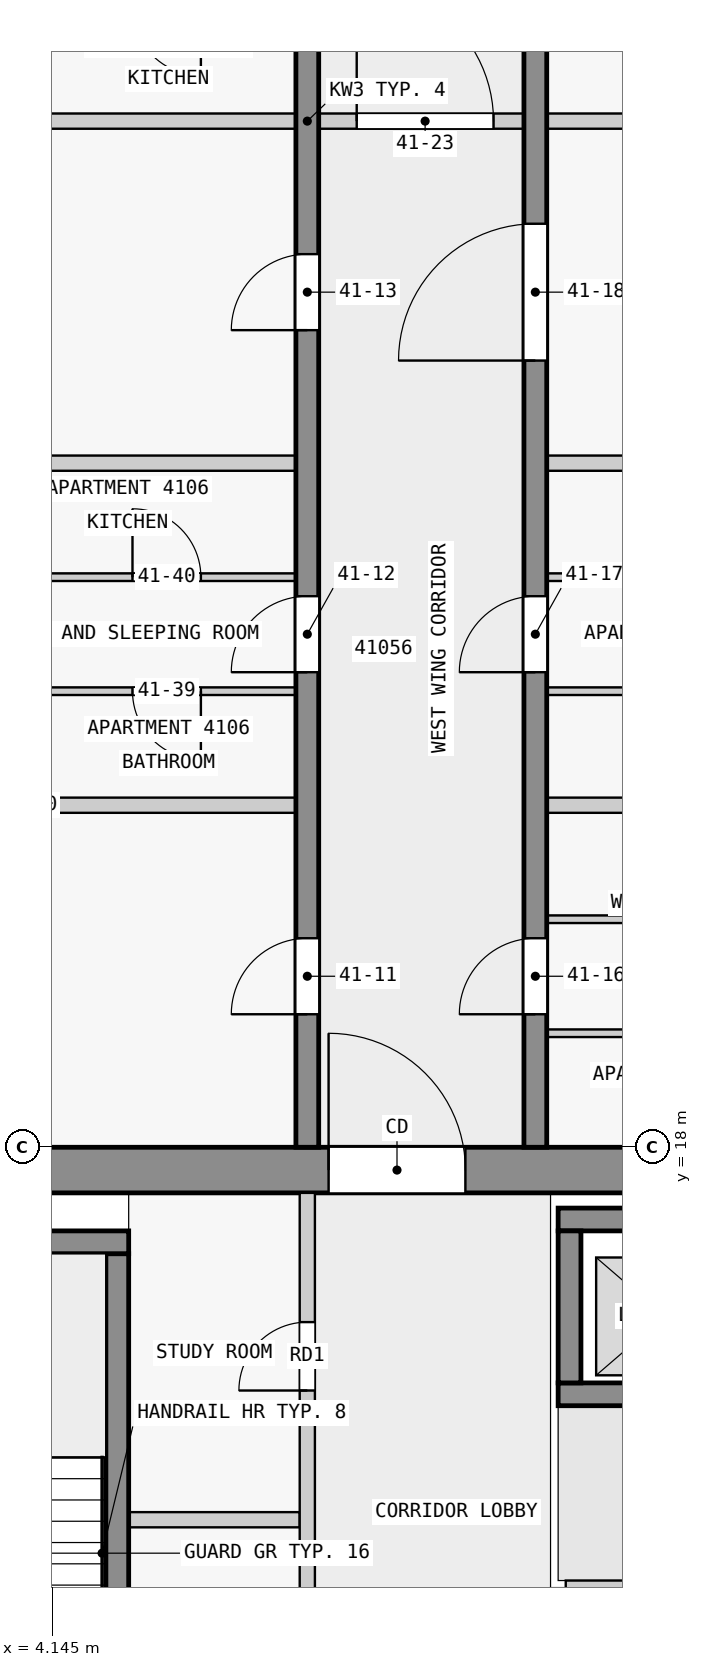
"""IFC4 building model, lengths in metres.
Left out: names, types, materials, properties, quantities, classifications, styles, units other than length and angle.
Written with IfcOpenShell. Run it as: python <this file> out.ifc"""

import sys

from ifc_helpers import new_model, si_unit, direction, frame, frame_2d, origin, place, context, subcontext, project, spatial, rectangle, extrude, element, fill, save


model = new_model("IFC4")
c1 = context("Model", 3, precision=1e-05, world=origin(), true_north=direction((0.0, 1.0)))
c2 = subcontext(c1, "Body", "Model", "MODEL_VIEW")
j1 = project(units=[si_unit("LENGTHUNIT", "METRE"), si_unit("PLANEANGLEUNIT", "RADIAN")], contexts=[c1])
p1 = place(None, origin())
s1 = spatial("IfcSite", under=j1, at=p1, CompositionType="ELEMENT")
p2 = place(p1, origin())
s2 = spatial("IfcBuilding", under=s1, at=p2, CompositionType="ELEMENT")
p3 = place(p2, frame((0.0, 0.0, 160.4)))
s3 = spatial("IfcBuildingStorey", under=s2, at=p3, CompositionType="ELEMENT", Elevation=160.4)
p4 = place(p3, frame((1.38, 17.7, 0.0), z_axis=(0.0, 0.0, 1.0), x_axis=(1.0, 0.0, 0.0)))
e1 = element("IfcWall", 1, at=p4, inside=s3, PredefinedType="SHEAR", context=c2, shape_type="SweptSolid", body=[
    extrude(rectangle(XDim=21.12, YDim=0.6, at=frame_2d((10.56, 0.0))), origin(), (0.0, 0.0, 1.0), 3.25),
])
p5 = place(p4, frame((6.4, 0.0, 0.0)))
e2 = element("IfcOpeningElement", 2, at=p5, cuts=e1, PredefinedType="OPENING", context=c2, shape_type="SweptSolid", body=[
    extrude(rectangle(XDim=1.8, YDim=2.1, at=frame_2d((0.9, 1.05))), frame((0.0, 0.31, 0.0), z_axis=(0.0, -1.0, 0.0), x_axis=(1.0, 0.0, 0.0)), (0.0, 0.0, 1.0), 0.62),
])
p6 = place(p3, frame((5.0, 10.2, 0.0), z_axis=(0.0, 0.0, 1.0), x_axis=(0.0, 1.0, 0.0)))
e3 = element("IfcWall", 3, at=p6, inside=s3, PredefinedType="SHEAR", context=c2, shape_type="SweptSolid", body=[
    extrude(rectangle(XDim=6.4, YDim=0.3, at=frame_2d((3.2, 0.0))), origin(), (0.0, 0.0, 1.0), 3.25),
])
p7 = place(p3, frame((2.3, 16.75, 0.0), z_axis=(0.0, 0.0, 1.0), x_axis=(1.0, 0.0, 0.0)))
e4 = element("IfcWall", 4, at=p7, inside=s3, PredefinedType="SHEAR", context=c2, shape_type="SweptSolid", body=[
    extrude(rectangle(XDim=2.85, YDim=0.3, at=frame_2d((1.425, 0.0))), origin(), (0.0, 0.0, 1.0), 3.25),
])
p8 = place(p3, frame((10.8, 17.05, 0.0), z_axis=(0.0, 0.0, 1.0), x_axis=(1.0, 0.0, 0.0)))
e5 = element("IfcWall", 5, at=p8, inside=s3, PredefinedType="SHEAR", context=c2, shape_type="SweptSolid", body=[
    extrude(rectangle(XDim=7.8, YDim=0.3, at=frame_2d((3.9, 0.0))), origin(), (0.0, 0.0, 1.0), 3.25),
])
p9 = place(p3, frame((10.8, 14.75, 0.0), z_axis=(0.0, 0.0, 1.0), x_axis=(1.0, 0.0, 0.0)))
e6 = element("IfcWall", 6, at=p9, inside=s3, PredefinedType="SHEAR", context=c2, shape_type="SweptSolid", body=[
    extrude(rectangle(XDim=7.8, YDim=0.3, at=frame_2d((3.9, 0.0))), origin(), (0.0, 0.0, 1.0), 3.25),
])
p10 = place(p9, frame((0.85, 0.0, 0.0)))
e7 = element("IfcOpeningElement", 7, at=p10, cuts=e6, PredefinedType="OPENING", context=c2, shape_type="SweptSolid", body=[
    extrude(rectangle(XDim=1.1, YDim=2.1, at=frame_2d((0.55, 1.05))), frame((0.0, 0.16, 0.0), z_axis=(0.0, -1.0, 0.0), x_axis=(1.0, 0.0, 0.0)), (0.0, 0.0, 1.0), 0.32),
])
p11 = place(p9, frame((3.35, 0.0, 0.0)))
e8 = element("IfcOpeningElement", 8, at=p11, cuts=e6, PredefinedType="OPENING", context=c2, shape_type="SweptSolid", body=[
    extrude(rectangle(XDim=1.1, YDim=2.1, at=frame_2d((0.55, 1.05))), frame((0.0, 0.16, 0.0), z_axis=(0.0, -1.0, 0.0), x_axis=(1.0, 0.0, 0.0)), (0.0, 0.0, 1.0), 0.32),
])
p12 = place(p9, frame((5.85, 0.0, 0.0)))
e9 = element("IfcOpeningElement", 9, at=p12, cuts=e6, PredefinedType="OPENING", context=c2, shape_type="SweptSolid", body=[
    extrude(rectangle(XDim=1.1, YDim=2.1, at=frame_2d((0.55, 1.05))), frame((0.0, 0.16, 0.0), z_axis=(0.0, -1.0, 0.0), x_axis=(1.0, 0.0, 0.0)), (0.0, 0.0, 1.0), 0.32),
])
p13 = place(p3, frame((10.95, 14.9, 0.0), z_axis=(0.0, 0.0, 1.0), x_axis=(0.0, 1.0, 0.0)))
e10 = element("IfcWall", 10, at=p13, inside=s3, PredefinedType="SHEAR", context=c2, shape_type="SweptSolid", body=[
    extrude(rectangle(XDim=2.0, YDim=0.3, at=frame_2d((1.0, 0.0))), origin(), (0.0, 0.0, 1.0), 3.25),
])
p14 = place(p3, frame((7.5, 18.0, 0.0), z_axis=(0.0, 0.0, 1.0), x_axis=(0.0, 1.0, 0.0)))
e11 = element("IfcWall", 11, at=p14, inside=s3, PredefinedType="SHEAR", context=c2, shape_type="SweptSolid", body=[
    extrude(rectangle(XDim=27.0, YDim=0.3, at=frame_2d((13.5, 0.0))), origin(), (0.0, 0.0, 1.0), 3.25),
])
p15 = place(p14, frame((1.75, 0.0, 0.0)))
e12 = element("IfcOpeningElement", 12, at=p15, cuts=e11, PredefinedType="OPENING", context=c2, shape_type="SweptSolid", body=[
    extrude(rectangle(XDim=1.0, YDim=2.1, at=frame_2d((0.5, 1.05))), frame((0.0, 0.16, 0.0), z_axis=(0.0, -1.0, 0.0), x_axis=(1.0, 0.0, 0.0)), (0.0, 0.0, 1.0), 0.32),
])
p16 = place(p14, frame((6.25, 0.0, 0.0)))
e13 = element("IfcOpeningElement", 13, at=p16, cuts=e11, PredefinedType="OPENING", context=c2, shape_type="SweptSolid", body=[
    extrude(rectangle(XDim=1.0, YDim=2.1, at=frame_2d((0.5, 1.05))), frame((0.0, 0.16, 0.0), z_axis=(0.0, -1.0, 0.0), x_axis=(1.0, 0.0, 0.0)), (0.0, 0.0, 1.0), 0.32),
])
p17 = place(p14, frame((10.75, 0.0, 0.0)))
e14 = element("IfcOpeningElement", 14, at=p17, cuts=e11, PredefinedType="OPENING", context=c2, shape_type="SweptSolid", body=[
    extrude(rectangle(XDim=1.0, YDim=2.1, at=frame_2d((0.5, 1.05))), frame((0.0, 0.16, 0.0), z_axis=(0.0, -1.0, 0.0), x_axis=(1.0, 0.0, 0.0)), (0.0, 0.0, 1.0), 0.32),
])
p18 = place(p14, frame((15.25, 0.0, 0.0)))
e15 = element("IfcOpeningElement", 15, at=p18, cuts=e11, PredefinedType="OPENING", context=c2, shape_type="SweptSolid", body=[
    extrude(rectangle(XDim=1.0, YDim=2.1, at=frame_2d((0.5, 1.05))), frame((0.0, 0.16, 0.0), z_axis=(0.0, -1.0, 0.0), x_axis=(1.0, 0.0, 0.0)), (0.0, 0.0, 1.0), 0.32),
])
p19 = place(p14, frame((21.35, 0.0, 0.0)))
e16 = element("IfcOpeningElement", 16, at=p19, cuts=e11, PredefinedType="OPENING", context=c2, shape_type="SweptSolid", body=[
    extrude(rectangle(XDim=1.0, YDim=2.1, at=frame_2d((0.5, 1.05))), frame((0.0, 0.16, 0.0), z_axis=(0.0, -1.0, 0.0), x_axis=(1.0, 0.0, 0.0)), (0.0, 0.0, 1.0), 0.32),
])
p20 = place(p3, frame((10.5, 18.0, 0.0), z_axis=(0.0, 0.0, 1.0), x_axis=(0.0, 1.0, 0.0)))
e17 = element("IfcWall", 17, at=p20, inside=s3, PredefinedType="SHEAR", context=c2, shape_type="SweptSolid", body=[
    extrude(rectangle(XDim=27.0, YDim=0.3, at=frame_2d((13.5, 0.0))), origin(), (0.0, 0.0, 1.0), 3.25),
])
p21 = place(p20, frame((1.75, 0.0, 0.0)))
e18 = element("IfcOpeningElement", 18, at=p21, cuts=e17, PredefinedType="OPENING", context=c2, shape_type="SweptSolid", body=[
    extrude(rectangle(XDim=1.0, YDim=2.1, at=frame_2d((0.5, 1.05))), frame((0.0, 0.16, 0.0), z_axis=(0.0, -1.0, 0.0), x_axis=(1.0, 0.0, 0.0)), (0.0, 0.0, 1.0), 0.32),
])
p22 = place(p20, frame((6.25, 0.0, 0.0)))
e19 = element("IfcOpeningElement", 19, at=p22, cuts=e17, PredefinedType="OPENING", context=c2, shape_type="SweptSolid", body=[
    extrude(rectangle(XDim=1.0, YDim=2.1, at=frame_2d((0.5, 1.05))), frame((0.0, 0.16, 0.0), z_axis=(0.0, -1.0, 0.0), x_axis=(1.0, 0.0, 0.0)), (0.0, 0.0, 1.0), 0.32),
])
p23 = place(p20, frame((10.35, 0.0, 0.0)))
e20 = element("IfcOpeningElement", 20, at=p23, cuts=e17, PredefinedType="OPENING", context=c2, shape_type="SweptSolid", body=[
    extrude(rectangle(XDim=1.8, YDim=2.1, at=frame_2d((0.9, 1.05))), frame((0.0, 0.16, 0.0), z_axis=(0.0, -1.0, 0.0), x_axis=(1.0, 0.0, 0.0)), (0.0, 0.0, 1.0), 0.32),
])
p24 = place(p20, frame((17.55, 0.0, 0.0)))
e21 = element("IfcOpeningElement", 21, at=p24, cuts=e17, PredefinedType="OPENING", context=c2, shape_type="SweptSolid", body=[
    extrude(rectangle(XDim=1.0, YDim=2.1, at=frame_2d((0.5, 1.05))), frame((0.0, 0.16, 0.0), z_axis=(0.0, -1.0, 0.0), x_axis=(1.0, 0.0, 0.0)), (0.0, 0.0, 1.0), 0.32),
])
p25 = place(p20, frame((23.25, 0.0, 0.0)))
e22 = element("IfcOpeningElement", 22, at=p25, cuts=e17, PredefinedType="OPENING", context=c2, shape_type="SweptSolid", body=[
    extrude(rectangle(XDim=0.9, YDim=2.1, at=frame_2d((0.45, 1.05))), frame((0.0, 0.16, 0.0), z_axis=(0.0, -1.0, 0.0), x_axis=(1.0, 0.0, 0.0)), (0.0, 0.0, 1.0), 0.32),
])
p26 = place(p20, frame((25.45, 0.0, 0.0)))
e23 = element("IfcOpeningElement", 23, at=p26, cuts=e17, PredefinedType="OPENING", context=c2, shape_type="SweptSolid", body=[
    extrude(rectangle(XDim=1.0, YDim=2.1, at=frame_2d((0.5, 1.05))), frame((0.0, 0.16, 0.0), z_axis=(0.0, -1.0, 0.0), x_axis=(1.0, 0.0, 0.0)), (0.0, 0.0, 1.0), 0.32),
])
p27 = place(p3, frame((10.9, 12.2, 0.0), z_axis=(0.0, 0.0, 1.0), x_axis=(1.0, 0.0, 0.0)))
e24 = element("IfcWall", 24, at=p27, inside=s3, PredefinedType="PARTITIONING", context=c2, shape_type="SweptSolid", body=[
    extrude(rectangle(XDim=8.5, YDim=0.2, at=frame_2d((4.25, 0.0))), origin(), (0.0, 0.0, 1.0), 3.25),
])
p28 = place(p27, frame((1.4, 0.0, 0.0)))
e25 = element("IfcOpeningElement", 25, at=p28, cuts=e24, PredefinedType="OPENING", context=c2, shape_type="SweptSolid", body=[
    extrude(rectangle(XDim=0.9, YDim=2.1, at=frame_2d((0.45, 1.05))), frame((0.0, 0.11, 0.0), z_axis=(0.0, -1.0, 0.0), x_axis=(1.0, 0.0, 0.0)), (0.0, 0.0, 1.0), 0.22),
])
p29 = place(p27, frame((5.75, 0.0, 0.0)))
e26 = element("IfcOpeningElement", 26, at=p29, cuts=e24, PredefinedType="OPENING", context=c2, shape_type="SweptSolid", body=[
    extrude(rectangle(XDim=0.9, YDim=2.1, at=frame_2d((0.45, 1.05))), frame((0.0, 0.11, 0.0), z_axis=(0.0, -1.0, 0.0), x_axis=(1.0, 0.0, 0.0)), (0.0, 0.0, 1.0), 0.22),
])
p30 = place(p3, frame((7.5, 10.1, 0.0), z_axis=(0.0, 0.0, 1.0), x_axis=(0.0, 1.0, 0.0)))
e27 = element("IfcWall", 27, at=p30, inside=s3, PredefinedType="PARTITIONING", context=c2, shape_type="SweptSolid", body=[
    extrude(rectangle(XDim=7.3, YDim=0.2, at=frame_2d((3.65, 0.0))), origin(), (0.0, 0.0, 1.0), 3.25),
])
p31 = place(p30, frame((1.05, 0.0, 0.0)))
e28 = element("IfcOpeningElement", 28, at=p31, cuts=e27, PredefinedType="OPENING", context=c2, shape_type="SweptSolid", body=[
    extrude(rectangle(XDim=0.9, YDim=2.1, at=frame_2d((0.45, 1.05))), frame((0.0, 0.11, 0.0), z_axis=(0.0, -1.0, 0.0), x_axis=(1.0, 0.0, 0.0)), (0.0, 0.0, 1.0), 0.22),
])
p32 = place(p30, frame((4.7, 0.0, 0.0)))
e29 = element("IfcOpeningElement", 29, at=p32, cuts=e27, PredefinedType="OPENING", context=c2, shape_type="SweptSolid", body=[
    extrude(rectangle(XDim=0.9, YDim=2.1, at=frame_2d((0.45, 1.05))), frame((0.0, 0.11, 0.0), z_axis=(0.0, -1.0, 0.0), x_axis=(1.0, 0.0, 0.0)), (0.0, 0.0, 1.0), 0.22),
])
p33 = place(p3, frame((5.15, 13.1, 0.0), z_axis=(0.0, 0.0, 1.0), x_axis=(1.0, 0.0, 0.0)))
e30 = element("IfcWall", 30, at=p33, inside=s3, PredefinedType="PARTITIONING", context=c2, shape_type="SweptSolid", body=[
    extrude(rectangle(XDim=2.25, YDim=0.2, at=frame_2d((1.125, 0.0))), origin(), (0.0, 0.0, 1.0), 3.25),
])
p34 = place(p3, frame((14.05, 19.5, 0.0), z_axis=(0.0, 0.0, 1.0), x_axis=(-1.0, 0.0, 0.0)))
e31 = element("IfcWall", 31, at=p34, inside=s3, PredefinedType="PARTITIONING", context=c2, shape_type="SweptSolid", body=[
    extrude(rectangle(XDim=3.4, YDim=0.1, at=frame_2d((1.7, 0.0))), origin(), (0.0, 0.0, 1.0), 3.25),
])
p35 = place(p34, frame((1.25, 0.0, 0.0)))
e32 = element("IfcOpeningElement", 32, at=p35, cuts=e31, PredefinedType="OPENING", context=c2, shape_type="SweptSolid", body=[
    extrude(rectangle(XDim=0.9, YDim=2.1, at=frame_2d((0.45, 1.05))), frame((0.0, 0.06, 0.0), z_axis=(0.0, -1.0, 0.0), x_axis=(1.0, 0.0, 0.0)), (0.0, 0.0, 1.0), 0.12),
])
p36 = place(p3, frame((10.65, 21.0, 0.0), z_axis=(0.0, 0.0, 1.0), x_axis=(1.0, 0.0, 0.0)))
e33 = element("IfcWall", 33, at=p36, inside=s3, PredefinedType="PARTITIONING", context=c2, shape_type="SweptSolid", body=[
    extrude(rectangle(XDim=3.4, YDim=0.1, at=frame_2d((1.7, 0.0))), origin(), (0.0, 0.0, 1.0), 3.25),
])
p37 = place(p36, frame((1.25, 0.0, 0.0)))
e34 = element("IfcOpeningElement", 34, at=p37, cuts=e33, PredefinedType="OPENING", context=c2, shape_type="SweptSolid", body=[
    extrude(rectangle(XDim=0.9, YDim=2.1, at=frame_2d((0.45, 1.05))), frame((0.0, 0.06, 0.0), z_axis=(0.0, -1.0, 0.0), x_axis=(1.0, 0.0, 0.0)), (0.0, 0.0, 1.0), 0.12),
])
p38 = place(p3, frame((7.35, 22.5, 0.0), z_axis=(0.0, 0.0, 1.0), x_axis=(-1.0, 0.0, 0.0)))
e35 = element("IfcWall", 35, at=p38, inside=s3, PredefinedType="PARTITIONING", context=c2, shape_type="SweptSolid", body=[
    extrude(rectangle(XDim=7.2, YDim=0.2, at=frame_2d((3.6, 0.0))), origin(), (0.0, 0.0, 1.0), 3.25),
])
p39 = place(p3, frame((13.95, 22.5, 0.0), z_axis=(0.0, 0.0, 1.0), x_axis=(-1.0, 0.0, 0.0)))
e36 = element("IfcWall", 36, at=p39, inside=s3, PredefinedType="PARTITIONING", context=c2, shape_type="SweptSolid", body=[
    extrude(rectangle(XDim=3.3, YDim=0.2, at=frame_2d((1.65, 0.0))), origin(), (0.0, 0.0, 1.0), 3.25),
])
p40 = place(p3, frame((7.35, 24.0, 0.0), z_axis=(0.0, 0.0, 1.0), x_axis=(-1.0, 0.0, 0.0)))
e37 = element("IfcWall", 37, at=p40, inside=s3, PredefinedType="PARTITIONING", context=c2, shape_type="SweptSolid", body=[
    extrude(rectangle(XDim=3.4, YDim=0.1, at=frame_2d((1.7, 0.0))), origin(), (0.0, 0.0, 1.0), 3.25),
])
p41 = place(p40, frame((1.25, 0.0, 0.0)))
e38 = element("IfcOpeningElement", 38, at=p41, cuts=e37, PredefinedType="OPENING", context=c2, shape_type="SweptSolid", body=[
    extrude(rectangle(XDim=0.9, YDim=2.1, at=frame_2d((0.45, 1.05))), frame((0.0, 0.06, 0.0), z_axis=(0.0, -1.0, 0.0), x_axis=(1.0, 0.0, 0.0)), (0.0, 0.0, 1.0), 0.12),
])
p42 = place(p3, frame((14.05, 24.0, 0.0), z_axis=(0.0, 0.0, 1.0), x_axis=(-1.0, 0.0, 0.0)))
e39 = element("IfcWall", 39, at=p42, inside=s3, PredefinedType="PARTITIONING", context=c2, shape_type="SweptSolid", body=[
    extrude(rectangle(XDim=3.4, YDim=0.1, at=frame_2d((1.7, 0.0))), origin(), (0.0, 0.0, 1.0), 3.25),
])
p43 = place(p42, frame((1.25, 0.0, 0.0)))
e40 = element("IfcOpeningElement", 40, at=p43, cuts=e39, PredefinedType="OPENING", context=c2, shape_type="SweptSolid", body=[
    extrude(rectangle(XDim=0.9, YDim=2.1, at=frame_2d((0.45, 1.05))), frame((0.0, 0.06, 0.0), z_axis=(0.0, -1.0, 0.0), x_axis=(1.0, 0.0, 0.0)), (0.0, 0.0, 1.0), 0.12),
])
p44 = place(p3, frame((3.95, 25.5, 0.0), z_axis=(0.0, 0.0, 1.0), x_axis=(1.0, 0.0, 0.0)))
e41 = element("IfcWall", 41, at=p44, inside=s3, PredefinedType="PARTITIONING", context=c2, shape_type="SweptSolid", body=[
    extrude(rectangle(XDim=3.4, YDim=0.1, at=frame_2d((1.7, 0.0))), origin(), (0.0, 0.0, 1.0), 3.25),
])
p45 = place(p44, frame((1.25, 0.0, 0.0)))
e42 = element("IfcOpeningElement", 42, at=p45, cuts=e41, PredefinedType="OPENING", context=c2, shape_type="SweptSolid", body=[
    extrude(rectangle(XDim=0.9, YDim=2.1, at=frame_2d((0.45, 1.05))), frame((0.0, 0.06, 0.0), z_axis=(0.0, -1.0, 0.0), x_axis=(1.0, 0.0, 0.0)), (0.0, 0.0, 1.0), 0.12),
])
p46 = place(p3, frame((10.65, 25.5, 0.0), z_axis=(0.0, 0.0, 1.0), x_axis=(1.0, 0.0, 0.0)))
e43 = element("IfcWall", 43, at=p46, inside=s3, PredefinedType="PARTITIONING", context=c2, shape_type="SweptSolid", body=[
    extrude(rectangle(XDim=3.4, YDim=0.1, at=frame_2d((1.7, 0.0))), origin(), (0.0, 0.0, 1.0), 3.25),
])
p47 = place(p46, frame((1.25, 0.0, 0.0)))
e44 = element("IfcOpeningElement", 44, at=p47, cuts=e43, PredefinedType="OPENING", context=c2, shape_type="SweptSolid", body=[
    extrude(rectangle(XDim=0.9, YDim=2.1, at=frame_2d((0.45, 1.05))), frame((0.0, 0.06, 0.0), z_axis=(0.0, -1.0, 0.0), x_axis=(1.0, 0.0, 0.0)), (0.0, 0.0, 1.0), 0.12),
])
for number, where, z_axis, x_axis in (
    (45, (7.35, 27.0, 0.0), (0.0, 0.0, 1.0), (-1.0, 0.0, 0.0)),
    (46, (13.95, 27.0, 0.0), (0.0, 0.0, 1.0), (-1.0, 0.0, 0.0)),
):
    element("IfcWall", number, at=place(p3, frame(where, z_axis=z_axis, x_axis=x_axis)), inside=s3, PredefinedType="PARTITIONING", context=c2, shape_type="SweptSolid", body=[
        extrude(rectangle(XDim=3.3, YDim=0.2, at=frame_2d((1.65, 0.0))), origin(), (0.0, 0.0, 1.0), 3.25),
    ])
for number, where, z_axis, x_axis in (
    (47, (7.35, 31.5, 0.0), (0.0, 0.0, 1.0), (-1.0, 0.0, 0.0)),
    (48, (17.85, 31.5, 0.0), (0.0, 0.0, 1.0), (-1.0, 0.0, 0.0)),
):
    element("IfcWall", number, at=place(p3, frame(where, z_axis=z_axis, x_axis=x_axis)), inside=s3, PredefinedType="PARTITIONING", context=c2, shape_type="SweptSolid", body=[
        extrude(rectangle(XDim=7.2, YDim=0.2, at=frame_2d((3.6, 0.0))), origin(), (0.0, 0.0, 1.0), 3.25),
    ])
p48 = place(p3, frame((7.45, 31.5, 0.0), z_axis=(0.0, 0.0, 1.0), x_axis=(1.0, 0.0, 0.0)))
e49 = element("IfcWall", 49, at=p48, inside=s3, PredefinedType="PARTITIONING", context=c2, shape_type="SweptSolid", body=[
    extrude(rectangle(XDim=3.1, YDim=0.2, at=frame_2d((1.55, 0.0))), origin(), (0.0, 0.0, 1.0), 3.25),
])
p49 = place(p48, frame((0.7, 0.0, 0.0)))
e50 = element("IfcOpeningElement", 50, at=p49, cuts=e49, PredefinedType="OPENING", context=c2, shape_type="SweptSolid", body=[
    extrude(rectangle(XDim=1.8, YDim=2.1, at=frame_2d((0.9, 1.05))), frame((0.0, 0.11, 0.0), z_axis=(0.0, -1.0, 0.0), x_axis=(1.0, 0.0, 0.0)), (0.0, 0.0, 1.0), 0.22),
])
p50 = place(p5, origin())
e51 = element("IfcDoor", 51, at=p50, inside=s3, OperationType="DOUBLE_DOOR_SINGLE_SWING", PredefinedType="DOOR", context=c2, shape_type="SweptSolid", body=[
    extrude(rectangle(XDim=1.8, YDim=2.1, at=frame_2d((0.9, 1.05))), frame((0.0, 0.025, 0.0), z_axis=(0.0, -1.0, 0.0), x_axis=(1.0, 0.0, 0.0)), (0.0, 0.0, 1.0), 0.05),
])
fill(e2, e51)
p51 = place(p32, origin())
e52 = element("IfcDoor", 52, at=p51, inside=s3, OperationType="SINGLE_SWING_RIGHT", PredefinedType="DOOR", context=c2, shape_type="SweptSolid", body=[
    extrude(rectangle(XDim=0.9, YDim=2.1, at=frame_2d((0.45, 1.05))), frame((0.0, 0.025, 0.0), z_axis=(0.0, -1.0, 0.0), x_axis=(1.0, 0.0, 0.0)), (0.0, 0.0, 1.0), 0.05),
])
fill(e29, e52)
p52 = place(p15, origin())
e53 = element("IfcDoor", 53, at=p52, inside=s3, OperationType="SINGLE_SWING_LEFT", PredefinedType="DOOR", context=c2, shape_type="SweptSolid", body=[
    extrude(rectangle(XDim=1.0, YDim=2.1, at=frame_2d((0.5, 1.05))), frame((0.0, 0.025, 0.0), z_axis=(0.0, -1.0, 0.0), x_axis=(1.0, 0.0, 0.0)), (0.0, 0.0, 1.0), 0.05),
])
fill(e12, e53)
p53 = place(p16, origin())
e54 = element("IfcDoor", 54, at=p53, inside=s3, OperationType="SINGLE_SWING_LEFT", PredefinedType="DOOR", context=c2, shape_type="SweptSolid", body=[
    extrude(rectangle(XDim=1.0, YDim=2.1, at=frame_2d((0.5, 1.05))), frame((0.0, 0.025, 0.0), z_axis=(0.0, -1.0, 0.0), x_axis=(1.0, 0.0, 0.0)), (0.0, 0.0, 1.0), 0.05),
])
fill(e13, e54)
p54 = place(p17, origin())
e55 = element("IfcDoor", 55, at=p54, inside=s3, OperationType="SINGLE_SWING_LEFT", PredefinedType="DOOR", context=c2, shape_type="SweptSolid", body=[
    extrude(rectangle(XDim=1.0, YDim=2.1, at=frame_2d((0.5, 1.05))), frame((0.0, 0.025, 0.0), z_axis=(0.0, -1.0, 0.0), x_axis=(1.0, 0.0, 0.0)), (0.0, 0.0, 1.0), 0.05),
])
fill(e14, e55)
p55 = place(p21, origin())
e56 = element("IfcDoor", 56, at=p55, inside=s3, OperationType="SINGLE_SWING_LEFT", PredefinedType="DOOR", context=c2, shape_type="SweptSolid", body=[
    extrude(rectangle(XDim=1.0, YDim=2.1, at=frame_2d((0.5, 1.05))), frame((0.0, 0.025, 0.0), z_axis=(0.0, -1.0, 0.0), x_axis=(1.0, 0.0, 0.0)), (0.0, 0.0, 1.0), 0.05),
])
fill(e18, e56)
p56 = place(p22, origin())
e57 = element("IfcDoor", 57, at=p56, inside=s3, OperationType="SINGLE_SWING_LEFT", PredefinedType="DOOR", context=c2, shape_type="SweptSolid", body=[
    extrude(rectangle(XDim=1.0, YDim=2.1, at=frame_2d((0.5, 1.05))), frame((0.0, 0.025, 0.0), z_axis=(0.0, -1.0, 0.0), x_axis=(1.0, 0.0, 0.0)), (0.0, 0.0, 1.0), 0.05),
])
fill(e19, e57)
p57 = place(p23, origin())
e58 = element("IfcDoor", 58, at=p57, inside=s3, OperationType="SINGLE_SWING_LEFT", PredefinedType="DOOR", context=c2, shape_type="SweptSolid", body=[
    extrude(rectangle(XDim=1.8, YDim=2.1, at=frame_2d((0.9, 1.05))), frame((0.0, 0.025, 0.0), z_axis=(0.0, -1.0, 0.0), x_axis=(1.0, 0.0, 0.0)), (0.0, 0.0, 1.0), 0.05),
])
fill(e20, e58)
p58 = place(p49, origin())
e59 = element("IfcDoor", 59, at=p58, inside=s3, OperationType="SINGLE_SWING_RIGHT", PredefinedType="DOOR", context=c2, shape_type="SweptSolid", body=[
    extrude(rectangle(XDim=1.8, YDim=2.1, at=frame_2d((0.9, 1.05))), frame((0.0, 0.025, 0.0), z_axis=(0.0, -1.0, 0.0), x_axis=(1.0, 0.0, 0.0)), (0.0, 0.0, 1.0), 0.05),
])
fill(e50, e59)
p59 = place(p41, origin())
e60 = element("IfcDoor", 60, at=p59, inside=s3, OperationType="SINGLE_SWING_RIGHT", PredefinedType="DOOR", context=c2, shape_type="SweptSolid", body=[
    extrude(rectangle(XDim=0.9, YDim=2.1, at=frame_2d((0.45, 1.05))), frame((0.0, 0.025, 0.0), z_axis=(0.0, -1.0, 0.0), x_axis=(1.0, 0.0, 0.0)), (0.0, 0.0, 1.0), 0.05),
])
fill(e38, e60)
p60 = place(p45, origin())
e61 = element("IfcDoor", 61, at=p60, inside=s3, OperationType="SINGLE_SWING_RIGHT", PredefinedType="DOOR", context=c2, shape_type="SweptSolid", body=[
    extrude(rectangle(XDim=0.9, YDim=2.1, at=frame_2d((0.45, 1.05))), frame((0.0, 0.025, 0.0), z_axis=(0.0, -1.0, 0.0), x_axis=(1.0, 0.0, 0.0)), (0.0, 0.0, 1.0), 0.05),
])
fill(e42, e61)
save(model, sys.argv[1])
